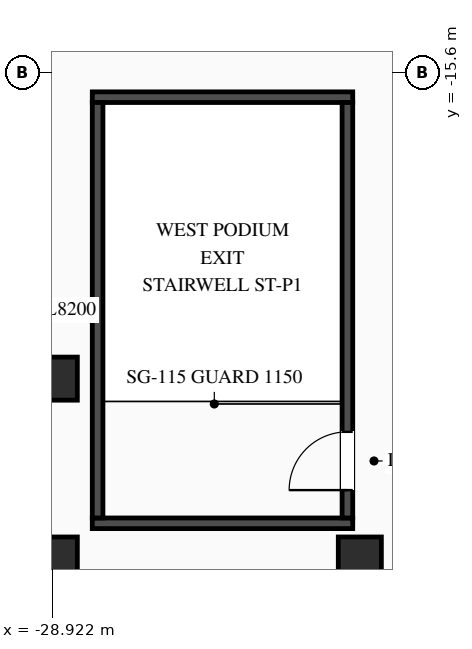
"""IFC4 building model, lengths in metres.
Left out: names, types, materials, properties, quantities, classifications, styles, units other than length and angle.
Written with IfcOpenShell. Run it as: python <this file> out.ifc"""

import sys

from ifc_helpers import new_model, si_unit, direction, frame, frame_2d, origin, origin_2d, place, context, subcontext, project, spatial, rectangle, i_section, extrude, element, fill, save


model = new_model("IFC4")
c1 = context("Model", 3, precision=1e-05, world=origin(), true_north=direction((0.0, 1.0)))
c2 = subcontext(c1, "Body", "Model", "MODEL_VIEW")
j1 = project(units=[si_unit("LENGTHUNIT", "METRE"), si_unit("PLANEANGLEUNIT", "RADIAN")], contexts=[c1])
p1 = place(None, origin())
s1 = spatial("IfcSite", under=j1, at=p1, CompositionType="ELEMENT")
p2 = place(p1, origin())
s2 = spatial("IfcBuilding", under=s1, at=p2, CompositionType="ELEMENT")
p3 = place(p2, frame((0.0, 0.0, 22.8)))
s3 = spatial("IfcBuildingStorey", under=s2, at=p3, CompositionType="ELEMENT", Elevation=22.8)
for number, where, z_axis, x_axis in (
    (1, (-28.13, -24.505, 0.0), (0.0, 0.0, 1.0), (1.0, 0.0, 0.0)),
    (2, (-28.13, -16.095, 0.0), (0.0, 0.0, 1.0), (1.0, 0.0, 0.0)),
):
    element("IfcWall", number, at=place(p3, frame(where, z_axis=z_axis, x_axis=x_axis)), inside=s3, PredefinedType="SHEAR", context=c2, shape_type="SweptSolid", body=[
        extrude(rectangle(XDim=5.14, YDim=0.21, at=frame_2d((2.57, 0.0))), origin(), (0.0, 0.0, 1.0), 3.92),
    ])
p4 = place(p3, frame((-28.025, -24.4, 0.0), z_axis=(0.0, 0.0, 1.0), x_axis=(0.0, 1.0, 0.0)))
e3 = element("IfcWall", 3, at=p4, inside=s3, PredefinedType="SHEAR", context=c2, shape_type="SweptSolid", body=[
    extrude(rectangle(XDim=8.2, YDim=0.21, at=frame_2d((4.1, 0.0))), origin(), (0.0, 0.0, 1.0), 3.92),
])
p5 = place(p3, frame((-23.095, -24.4, 0.0), z_axis=(0.0, 0.0, 1.0), x_axis=(0.0, 1.0, 0.0)))
e4 = element("IfcWall", 4, at=p5, inside=s3, PredefinedType="SHEAR", context=c2, shape_type="SweptSolid", body=[
    extrude(rectangle(XDim=8.2, YDim=0.21, at=frame_2d((4.1, 0.0))), origin(), (0.0, 0.0, 1.0), 3.92),
])
p6 = place(p5, frame((0.55, 0.0, 0.0)))
e5 = element("IfcOpeningElement", 5, at=p6, cuts=e4, PredefinedType="OPENING", context=c2, shape_type="SweptSolid", body=[
    extrude(rectangle(XDim=1.15, YDim=2.1, at=frame_2d((0.575, 1.05))), frame((0.0, 0.115, 0.0), z_axis=(0.0, -1.0, 0.0), x_axis=(1.0, 0.0, 0.0)), (0.0, 0.0, 1.0), 0.23),
])
for number, where, z_axis, x_axis in (
    (6, (-28.85, -21.65, 0.0), (0.0, 0.0, 1.0), (1.0, 0.0, 0.0)),
    (7, (-28.85, -25.2, 0.0), (0.0, 0.0, 1.0), (1.0, 0.0, 0.0)),
    (8, (-22.85, -25.2, 0.0), (0.0, 0.0, 1.0), (1.0, 0.0, 0.0)),
):
    element("IfcColumn", number, at=place(p3, frame(where, z_axis=z_axis, x_axis=x_axis)), inside=s3, PredefinedType="COLUMN", context=c2, shape_type="SweptSolid", body=[
        extrude(i_section(OverallWidth=0.85, OverallDepth=0.85, WebThickness=0.032, FlangeThickness=0.048, at=origin_2d()), origin(), (0.0, 0.0, 1.0), 4.2),
    ])
p7 = place(p6, origin())
e9 = element("IfcDoor", 9, at=p7, inside=s3, OperationType="SINGLE_SWING_LEFT", PredefinedType="DOOR", context=c2, shape_type="SweptSolid", body=[
    extrude(rectangle(XDim=1.15, YDim=2.1, at=frame_2d((0.575, 1.05))), frame((0.0, 0.025, 0.0), z_axis=(0.0, -1.0, 0.0), x_axis=(1.0, 0.0, 0.0)), (0.0, 0.0, 1.0), 0.05),
])
fill(e5, e9)
save(model, sys.argv[1])
